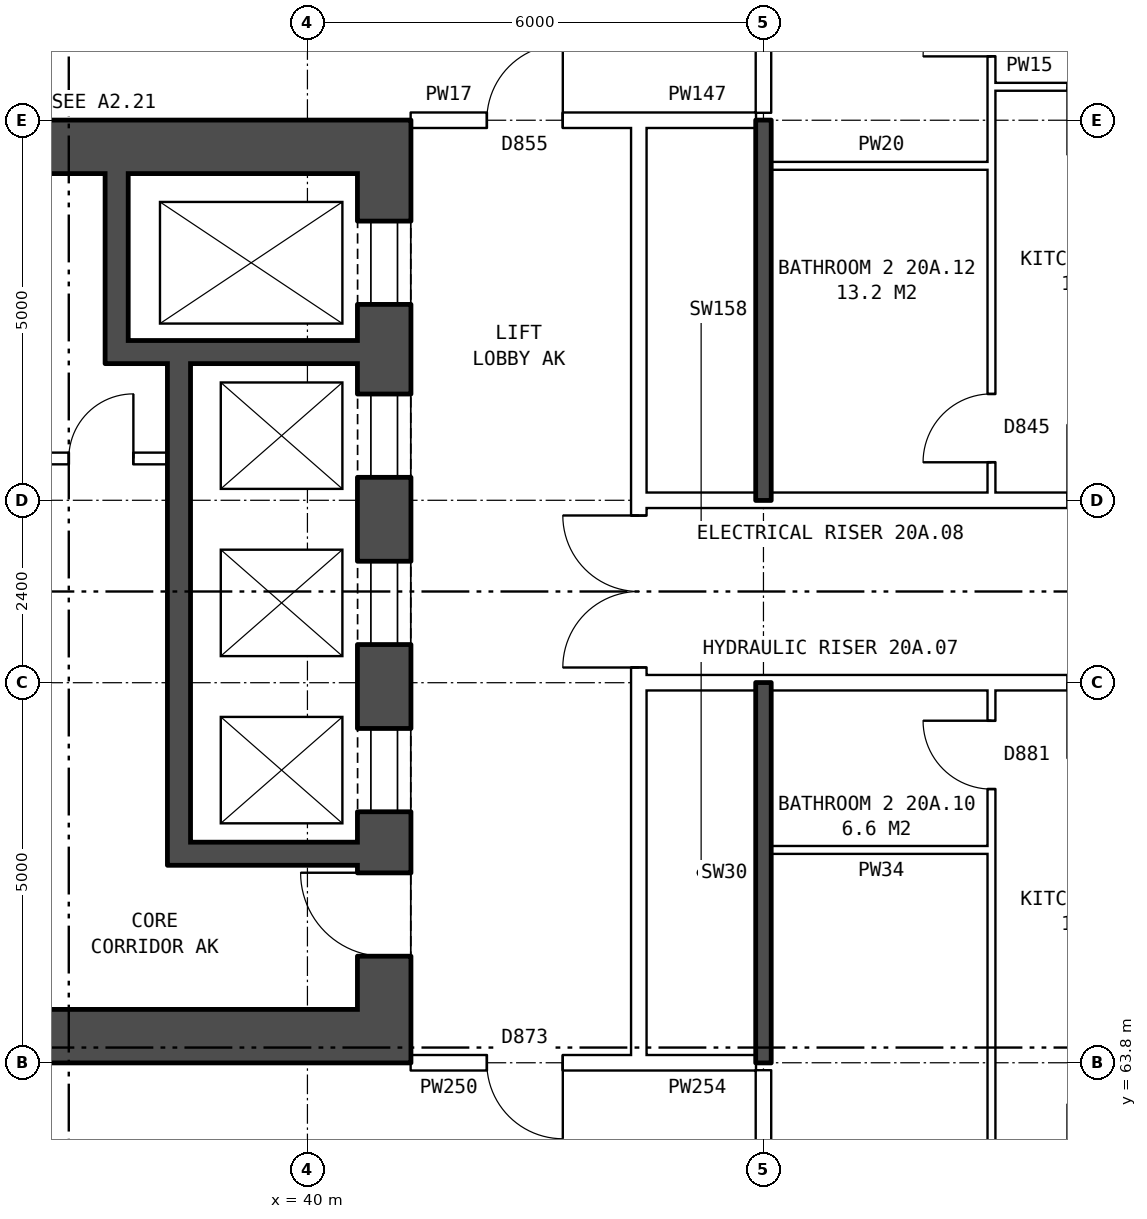
"""IFC4 building model, lengths in metres.
Left out: names, types, materials, properties, quantities, classifications, styles, units other than length and angle.
Written with IfcOpenShell. Run it as: python <this file> out.ifc"""

import sys

from ifc_helpers import new_model, si_unit, direction, frame, frame_2d, origin, place, context, subcontext, project, spatial, rectangle, extrude, element, fill, save


model = new_model("IFC4")
c1 = context("Model", 3, precision=1e-05, world=origin(), true_north=direction((0.0, 1.0)))
c2 = subcontext(c1, "Body", "Model", "MODEL_VIEW")
j1 = project(units=[si_unit("LENGTHUNIT", "METRE"), si_unit("PLANEANGLEUNIT", "RADIAN")], contexts=[c1])
p1 = place(None, origin())
s1 = spatial("IfcSite", under=j1, at=p1, CompositionType="ELEMENT")
p2 = place(p1, origin())
s2 = spatial("IfcBuilding", under=s1, at=p2, CompositionType="ELEMENT")
p3 = place(p2, frame((0.0, 0.0, 74.7)))
s3 = spatial("IfcBuildingStorey", under=s2, at=p3, CompositionType="ELEMENT", Elevation=74.7)
p4 = place(p3, frame((41.01, 75.5, 0.0), z_axis=(0.0, 0.0, 1.0), x_axis=(0.0, -1.0, 0.0)))
e1 = element("IfcWall", 1, at=p4, inside=s3, PredefinedType="SHEAR", context=c2, shape_type="SweptSolid", body=[
    extrude(rectangle(XDim=11.0, YDim=0.7, at=frame_2d((5.5, 0.0))), origin(), (0.0, 0.0, 1.0), 2.85),
])
p5 = place(p4, frame((0.625, 0.0, 0.0)))
e2 = element("IfcOpeningElement", 2, at=p5, cuts=e1, PredefinedType="OPENING", context=c2, shape_type="SweptSolid", body=[
    extrude(rectangle(XDim=1.1, YDim=2.1, at=frame_2d((0.55, 1.05))), frame((0.0, 0.36, 0.0), z_axis=(0.0, -1.0, 0.0), x_axis=(1.0, 0.0, 0.0)), (0.0, 0.0, 1.0), 0.72),
])
p6 = place(p4, frame((2.9, 0.0, 0.0)))
e3 = element("IfcOpeningElement", 3, at=p6, cuts=e1, PredefinedType="OPENING", context=c2, shape_type="SweptSolid", body=[
    extrude(rectangle(XDim=1.1, YDim=2.1, at=frame_2d((0.55, 1.05))), frame((0.0, 0.36, 0.0), z_axis=(0.0, -1.0, 0.0), x_axis=(1.0, 0.0, 0.0)), (0.0, 0.0, 1.0), 0.72),
])
p7 = place(p4, frame((5.1, 0.0, 0.0)))
e4 = element("IfcOpeningElement", 4, at=p7, cuts=e1, PredefinedType="OPENING", context=c2, shape_type="SweptSolid", body=[
    extrude(rectangle(XDim=1.1, YDim=2.1, at=frame_2d((0.55, 1.05))), frame((0.0, 0.36, 0.0), z_axis=(0.0, -1.0, 0.0), x_axis=(1.0, 0.0, 0.0)), (0.0, 0.0, 1.0), 0.72),
])
p8 = place(p4, frame((7.3, 0.0, 0.0)))
e5 = element("IfcOpeningElement", 5, at=p8, cuts=e1, PredefinedType="OPENING", context=c2, shape_type="SweptSolid", body=[
    extrude(rectangle(XDim=1.1, YDim=2.1, at=frame_2d((0.55, 1.05))), frame((0.0, 0.36, 0.0), z_axis=(0.0, -1.0, 0.0), x_axis=(1.0, 0.0, 0.0)), (0.0, 0.0, 1.0), 0.72),
])
p9 = place(p4, frame((9.2, 0.0, 0.0)))
e6 = element("IfcOpeningElement", 6, at=p9, cuts=e1, PredefinedType="OPENING", context=c2, shape_type="SweptSolid", body=[
    extrude(rectangle(XDim=1.1, YDim=2.1, at=frame_2d((0.55, 1.05))), frame((0.0, 0.36, 0.0), z_axis=(0.0, -1.0, 0.0), x_axis=(1.0, 0.0, 0.0)), (0.0, 0.0, 1.0), 0.72),
])
for number, where, z_axis, x_axis in (
    (7, (41.36, 75.85, 0.0), (0.0, 0.0, 1.0), (-1.0, 0.0, 0.0)),
    (8, (41.36, 64.15, 0.0), (0.0, 0.0, 1.0), (-1.0, 0.0, 0.0)),
):
    element("IfcWall", number, at=place(p3, frame(where, z_axis=z_axis, x_axis=x_axis)), inside=s3, PredefinedType="SHEAR", context=c2, shape_type="SweptSolid", body=[
        extrude(rectangle(XDim=9.0, YDim=0.7, at=frame_2d((4.5, 0.0))), origin(), (0.0, 0.0, 1.0), 2.85),
    ])
p10 = place(p3, frame((40.66, 73.15, 0.0), z_axis=(0.0, 0.0, 1.0), x_axis=(-1.0, 0.0, 0.0)))
e9 = element("IfcWall", 9, at=p10, inside=s3, PredefinedType="SHEAR", context=c2, shape_type="SweptSolid", body=[
    extrude(rectangle(XDim=3.32, YDim=0.3, at=frame_2d((1.66, 0.0))), origin(), (0.0, 0.0, 1.0), 2.85),
])
p11 = place(p3, frame((38.16, 71.75, 0.0), z_axis=(0.0, 0.0, 1.0), x_axis=(-1.0, 0.0, 0.0)))
e10 = element("IfcWall", 10, at=p11, inside=s3, PredefinedType="PARTITIONING", context=c2, shape_type="SweptSolid", body=[
    extrude(rectangle(XDim=1.75, YDim=0.15, at=frame_2d((0.875, 0.0))), origin(), (0.0, 0.0, 1.0), 2.85),
])
p12 = place(p11, frame((0.45, 0.0, 0.0)))
e11 = element("IfcOpeningElement", 11, at=p12, cuts=e10, PredefinedType="OPENING", context=c2, shape_type="SweptSolid", body=[
    extrude(rectangle(XDim=0.85, YDim=2.1, at=frame_2d((0.425, 1.05))), frame((0.0, 0.085, 0.0), z_axis=(0.0, -1.0, 0.0), x_axis=(1.0, 0.0, 0.0)), (0.0, 0.0, 1.0), 0.17),
])
p13 = place(p3, frame((40.66, 66.55, 0.0), z_axis=(0.0, 0.0, 1.0), x_axis=(-1.0, 0.0, 0.0)))
e12 = element("IfcWall", 12, at=p13, inside=s3, PredefinedType="SHEAR", context=c2, shape_type="SweptSolid", body=[
    extrude(rectangle(XDim=2.2, YDim=0.3, at=frame_2d((1.1, 0.0))), origin(), (0.0, 0.0, 1.0), 2.85),
])
p14 = place(p3, frame((38.31, 73.0, 0.0), z_axis=(0.0, 0.0, 1.0), x_axis=(0.0, -1.0, 0.0)))
e13 = element("IfcWall", 13, at=p14, inside=s3, PredefinedType="SHEAR", context=c2, shape_type="SweptSolid", body=[
    extrude(rectangle(XDim=6.6, YDim=0.3, at=frame_2d((3.3, 0.0))), origin(), (0.0, 0.0, 1.0), 2.85),
])
p15 = place(p3, frame((37.49, 75.5, 0.0), z_axis=(0.0, 0.0, 1.0), x_axis=(0.0, -1.0, 0.0)))
e14 = element("IfcWall", 14, at=p15, inside=s3, PredefinedType="SHEAR", context=c2, shape_type="SweptSolid", body=[
    extrude(rectangle(XDim=2.2, YDim=0.3, at=frame_2d((1.1, 0.0))), origin(), (0.0, 0.0, 1.0), 2.85),
])
p16 = place(p3, frame((44.36, 63.9, 0.0), z_axis=(0.0, 0.0, 1.0), x_axis=(0.0, 1.0, 0.0)))
e15 = element("IfcWall", 15, at=p16, inside=s3, PredefinedType="PARTITIONING", context=c2, shape_type="SweptSolid", body=[
    extrude(rectangle(XDim=12.2, YDim=0.2, at=frame_2d((6.1, 0.0))), origin(), (0.0, 0.0, 1.0), 2.85),
])
p17 = place(p16, frame((5.1, 0.0, 0.0)))
e16 = element("IfcOpeningElement", 16, at=p17, cuts=e15, PredefinedType="OPENING", context=c2, shape_type="SweptSolid", body=[
    extrude(rectangle(XDim=2.0, YDim=2.1, at=frame_2d((1.0, 1.05))), frame((0.0, 0.11, 0.0), z_axis=(0.0, -1.0, 0.0), x_axis=(1.0, 0.0, 0.0)), (0.0, 0.0, 1.0), 0.22),
])
p18 = place(p3, frame((41.36, 63.8, 0.0), z_axis=(0.0, 0.0, 1.0), x_axis=(1.0, 0.0, 0.0)))
e17 = element("IfcWall", 17, at=p18, inside=s3, PredefinedType="PARTITIONING", context=c2, shape_type="SweptSolid", body=[
    extrude(rectangle(XDim=3.0, YDim=0.2, at=frame_2d((1.5, 0.0))), origin(), (0.0, 0.0, 1.0), 2.85),
])
p19 = place(p18, frame((1.0, 0.0, 0.0)))
e18 = element("IfcOpeningElement", 18, at=p19, cuts=e17, PredefinedType="OPENING", context=c2, shape_type="SweptSolid", body=[
    extrude(rectangle(XDim=1.0, YDim=2.1, at=frame_2d((0.5, 1.05))), frame((0.0, 0.11, 0.0), z_axis=(0.0, -1.0, 0.0), x_axis=(1.0, 0.0, 0.0)), (0.0, 0.0, 1.0), 0.22),
])
p20 = place(p3, frame((44.36, 63.8, 0.0), z_axis=(0.0, 0.0, 1.0), x_axis=(1.0, 0.0, 0.0)))
e19 = element("IfcWall", 19, at=p20, inside=s3, PredefinedType="PARTITIONING", context=c2, shape_type="SweptSolid", body=[
    extrude(rectangle(XDim=1.54, YDim=0.2, at=frame_2d((0.77, 0.0))), origin(), (0.0, 0.0, 1.0), 2.85),
])
p21 = place(p3, frame((46.1, 66.6, 0.0), z_axis=(0.0, 0.0, 1.0), x_axis=(1.0, 0.0, 0.0)))
e20 = element("IfcWall", 20, at=p21, inside=s3, PredefinedType="PARTITIONING", context=c2, shape_type="SweptSolid", body=[
    extrude(rectangle(XDim=2.9, YDim=0.1, at=frame_2d((1.45, 0.0))), origin(), (0.0, 0.0, 1.0), 2.85),
])
p22 = place(p3, frame((44.36, 68.8, 0.0), z_axis=(0.0, 0.0, 1.0), x_axis=(1.0, 0.0, 0.0)))
e21 = element("IfcWall", 21, at=p22, inside=s3, PredefinedType="PARTITIONING", context=c2, shape_type="SweptSolid", body=[
    extrude(rectangle(XDim=19.28, YDim=0.2, at=frame_2d((9.64, 0.0))), origin(), (0.0, 0.0, 1.0), 2.85),
])
p23 = place(p22, frame((14.64, 0.0, 0.0)))
e22 = element("IfcOpeningElement", 22, at=p23, cuts=e21, PredefinedType="OPENING", context=c2, shape_type="SweptSolid", body=[
    extrude(rectangle(XDim=1.0, YDim=2.1, at=frame_2d((0.5, 1.05))), frame((0.0, 0.11, 0.0), z_axis=(0.0, -1.0, 0.0), x_axis=(1.0, 0.0, 0.0)), (0.0, 0.0, 1.0), 0.22),
])
p24 = place(p22, frame((5.64, 0.0, 0.0)))
e23 = element("IfcOpeningElement", 23, at=p24, cuts=e21, PredefinedType="OPENING", context=c2, shape_type="SweptSolid", body=[
    extrude(rectangle(XDim=1.0, YDim=2.1, at=frame_2d((0.5, 1.05))), frame((0.0, 0.11, 0.0), z_axis=(0.0, -1.0, 0.0), x_axis=(1.0, 0.0, 0.0)), (0.0, 0.0, 1.0), 0.22),
])
p25 = place(p3, frame((44.36, 71.2, 0.0), z_axis=(0.0, 0.0, 1.0), x_axis=(1.0, 0.0, 0.0)))
e24 = element("IfcWall", 24, at=p25, inside=s3, PredefinedType="PARTITIONING", context=c2, shape_type="SweptSolid", body=[
    extrude(rectangle(XDim=19.28, YDim=0.2, at=frame_2d((9.64, 0.0))), origin(), (0.0, 0.0, 1.0), 2.85),
])
p26 = place(p25, frame((14.64, 0.0, 0.0)))
e25 = element("IfcOpeningElement", 25, at=p26, cuts=e24, PredefinedType="OPENING", context=c2, shape_type="SweptSolid", body=[
    extrude(rectangle(XDim=1.0, YDim=2.1, at=frame_2d((0.5, 1.05))), frame((0.0, 0.11, 0.0), z_axis=(0.0, -1.0, 0.0), x_axis=(1.0, 0.0, 0.0)), (0.0, 0.0, 1.0), 0.22),
])
p27 = place(p25, frame((5.64, 0.0, 0.0)))
e26 = element("IfcOpeningElement", 26, at=p27, cuts=e24, PredefinedType="OPENING", context=c2, shape_type="SweptSolid", body=[
    extrude(rectangle(XDim=1.0, YDim=2.1, at=frame_2d((0.5, 1.05))), frame((0.0, 0.11, 0.0), z_axis=(0.0, -1.0, 0.0), x_axis=(1.0, 0.0, 0.0)), (0.0, 0.0, 1.0), 0.22),
])
p28 = place(p3, frame((46.1, 75.6, 0.0), z_axis=(0.0, 0.0, 1.0), x_axis=(1.0, 0.0, 0.0)))
e27 = element("IfcWall", 27, at=p28, inside=s3, PredefinedType="PARTITIONING", context=c2, shape_type="SweptSolid", body=[
    extrude(rectangle(XDim=2.9, YDim=0.1, at=frame_2d((1.45, 0.0))), origin(), (0.0, 0.0, 1.0), 2.85),
])
p29 = place(p3, frame((41.36, 76.2, 0.0), z_axis=(0.0, 0.0, 1.0), x_axis=(1.0, 0.0, 0.0)))
e28 = element("IfcWall", 28, at=p29, inside=s3, PredefinedType="PARTITIONING", context=c2, shape_type="SweptSolid", body=[
    extrude(rectangle(XDim=3.0, YDim=0.2, at=frame_2d((1.5, 0.0))), origin(), (0.0, 0.0, 1.0), 2.85),
])
p30 = place(p29, frame((1.0, 0.0, 0.0)))
e29 = element("IfcOpeningElement", 29, at=p30, cuts=e28, PredefinedType="OPENING", context=c2, shape_type="SweptSolid", body=[
    extrude(rectangle(XDim=1.0, YDim=2.1, at=frame_2d((0.5, 1.05))), frame((0.0, 0.11, 0.0), z_axis=(0.0, -1.0, 0.0), x_axis=(1.0, 0.0, 0.0)), (0.0, 0.0, 1.0), 0.22),
])
p31 = place(p3, frame((44.36, 76.2, 0.0), z_axis=(0.0, 0.0, 1.0), x_axis=(1.0, 0.0, 0.0)))
e30 = element("IfcWall", 30, at=p31, inside=s3, PredefinedType="PARTITIONING", context=c2, shape_type="SweptSolid", body=[
    extrude(rectangle(XDim=1.54, YDim=0.2, at=frame_2d((0.77, 0.0))), origin(), (0.0, 0.0, 1.0), 2.85),
])
p32 = place(p3, frame((49.0, 76.64, 0.0), z_axis=(0.0, 0.0, 1.0), x_axis=(1.0, 0.0, 0.0)))
e31 = element("IfcWall", 31, at=p32, inside=s3, PredefinedType="PARTITIONING", context=c2, shape_type="SweptSolid", body=[
    extrude(rectangle(XDim=2.9, YDim=0.1, at=frame_2d((1.45, 0.0))), origin(), (0.0, 0.0, 1.0), 2.85),
])
p33 = place(p32, frame((1.0, 0.0, 0.0)))
e32 = element("IfcOpeningElement", 32, at=p33, cuts=e31, PredefinedType="OPENING", context=c2, shape_type="SweptSolid", body=[
    extrude(rectangle(XDim=0.9, YDim=2.1, at=frame_2d((0.45, 1.05))), frame((0.0, 0.06, 0.0), z_axis=(0.0, -1.0, 0.0), x_axis=(1.0, 0.0, 0.0)), (0.0, 0.0, 1.0), 0.12),
])
p34 = place(p3, frame((46.0, 61.5, 0.0), z_axis=(0.0, 0.0, 1.0), x_axis=(0.0, 1.0, 0.0)))
e33 = element("IfcWall", 33, at=p34, inside=s3, PredefinedType="PARTITIONING", context=c2, shape_type="SweptSolid", body=[
    extrude(rectangle(XDim=2.2, YDim=0.2, at=frame_2d((1.1, 0.0))), origin(), (0.0, 0.0, 1.0), 2.85),
])
for number, where, z_axis, x_axis in (
    (34, (46.0, 63.8, 0.0), (0.0, 0.0, 1.0), (0.0, 1.0, 0.0)),
    (35, (46.0, 71.2, 0.0), (0.0, 0.0, 1.0), (0.0, 1.0, 0.0)),
):
    element("IfcWall", number, at=place(p3, frame(where, z_axis=z_axis, x_axis=x_axis)), inside=s3, PredefinedType="SOLIDWALL", context=c2, shape_type="SweptSolid", body=[
        extrude(rectangle(XDim=5.0, YDim=0.2, at=frame_2d((2.5, 0.0))), origin(), (0.0, 0.0, 1.0), 2.85),
    ])
p35 = place(p3, frame((46.0, 76.3, 0.0), z_axis=(0.0, 0.0, 1.0), x_axis=(0.0, 1.0, 0.0)))
e36 = element("IfcWall", 36, at=p35, inside=s3, PredefinedType="PARTITIONING", context=c2, shape_type="SweptSolid", body=[
    extrude(rectangle(XDim=2.2, YDim=0.2, at=frame_2d((1.1, 0.0))), origin(), (0.0, 0.0, 1.0), 2.85),
])
p36 = place(p3, frame((49.0, 54.36, 0.0), z_axis=(0.0, 0.0, 1.0), x_axis=(0.0, 1.0, 0.0)))
e37 = element("IfcWall", 37, at=p36, inside=s3, PredefinedType="PARTITIONING", context=c2, shape_type="SweptSolid", body=[
    extrude(rectangle(XDim=14.34, YDim=0.1, at=frame_2d((7.17, 0.0))), origin(), (0.0, 0.0, 1.0), 2.85),
])
p37 = place(p36, frame((6.7, 0.0, 0.0)))
e38 = element("IfcOpeningElement", 38, at=p37, cuts=e37, PredefinedType="OPENING", context=c2, shape_type="SweptSolid", body=[
    extrude(rectangle(XDim=0.9, YDim=2.1, at=frame_2d((0.45, 1.05))), frame((0.0, 0.06, 0.0), z_axis=(0.0, -1.0, 0.0), x_axis=(1.0, 0.0, 0.0)), (0.0, 0.0, 1.0), 0.12),
])
p38 = place(p36, frame((13.04, 0.0, 0.0)))
e39 = element("IfcOpeningElement", 39, at=p38, cuts=e37, PredefinedType="OPENING", context=c2, shape_type="SweptSolid", body=[
    extrude(rectangle(XDim=0.9, YDim=2.1, at=frame_2d((0.45, 1.05))), frame((0.0, 0.06, 0.0), z_axis=(0.0, -1.0, 0.0), x_axis=(1.0, 0.0, 0.0)), (0.0, 0.0, 1.0), 0.12),
])
p39 = place(p3, frame((49.0, 71.3, 0.0), z_axis=(0.0, 0.0, 1.0), x_axis=(0.0, 1.0, 0.0)))
e40 = element("IfcWall", 40, at=p39, inside=s3, PredefinedType="PARTITIONING", context=c2, shape_type="SweptSolid", body=[
    extrude(rectangle(XDim=14.34, YDim=0.1, at=frame_2d((7.17, 0.0))), origin(), (0.0, 0.0, 1.0), 2.85),
])
p40 = place(p39, frame((5.74, 0.0, 0.0)))
e41 = element("IfcOpeningElement", 41, at=p40, cuts=e40, PredefinedType="OPENING", context=c2, shape_type="SweptSolid", body=[
    extrude(rectangle(XDim=0.9, YDim=2.1, at=frame_2d((0.45, 1.05))), frame((0.0, 0.06, 0.0), z_axis=(0.0, -1.0, 0.0), x_axis=(1.0, 0.0, 0.0)), (0.0, 0.0, 1.0), 0.12),
])
p41 = place(p39, frame((0.4, 0.0, 0.0)))
e42 = element("IfcOpeningElement", 42, at=p41, cuts=e40, PredefinedType="OPENING", context=c2, shape_type="SweptSolid", body=[
    extrude(rectangle(XDim=0.9, YDim=2.1, at=frame_2d((0.45, 1.05))), frame((0.0, 0.06, 0.0), z_axis=(0.0, -1.0, 0.0), x_axis=(1.0, 0.0, 0.0)), (0.0, 0.0, 1.0), 0.12),
])
p42 = place(p5, origin())
e43 = element("IfcDoor", 43, at=p42, inside=s3, OperationType="DOUBLE_DOOR_SLIDING", PredefinedType="DOOR", context=c2, shape_type="SweptSolid", body=[
    extrude(rectangle(XDim=1.1, YDim=2.1, at=frame_2d((0.55, 1.05))), frame((0.0, -0.285, 0.0), z_axis=(0.0, -1.0, 0.0), x_axis=(1.0, 0.0, 0.0)), (0.0, 0.0, 1.0), 0.05),
])
fill(e2, e43)
p43 = place(p6, origin())
e44 = element("IfcDoor", 44, at=p43, inside=s3, OperationType="DOUBLE_DOOR_SLIDING", PredefinedType="DOOR", context=c2, shape_type="SweptSolid", body=[
    extrude(rectangle(XDim=1.1, YDim=2.1, at=frame_2d((0.55, 1.05))), frame((0.0, -0.285, 0.0), z_axis=(0.0, -1.0, 0.0), x_axis=(1.0, 0.0, 0.0)), (0.0, 0.0, 1.0), 0.05),
])
fill(e3, e44)
p44 = place(p7, origin())
e45 = element("IfcDoor", 45, at=p44, inside=s3, OperationType="DOUBLE_DOOR_SLIDING", PredefinedType="DOOR", context=c2, shape_type="SweptSolid", body=[
    extrude(rectangle(XDim=1.1, YDim=2.1, at=frame_2d((0.55, 1.05))), frame((0.0, -0.285, 0.0), z_axis=(0.0, -1.0, 0.0), x_axis=(1.0, 0.0, 0.0)), (0.0, 0.0, 1.0), 0.05),
])
fill(e4, e45)
p45 = place(p8, origin())
e46 = element("IfcDoor", 46, at=p45, inside=s3, OperationType="DOUBLE_DOOR_SLIDING", PredefinedType="DOOR", context=c2, shape_type="SweptSolid", body=[
    extrude(rectangle(XDim=1.1, YDim=2.1, at=frame_2d((0.55, 1.05))), frame((0.0, -0.285, 0.0), z_axis=(0.0, -1.0, 0.0), x_axis=(1.0, 0.0, 0.0)), (0.0, 0.0, 1.0), 0.05),
])
fill(e5, e46)
p46 = place(p9, frame((1.1, 0.0, 0.0), z_axis=(0.0, 0.0, 1.0), x_axis=(-1.0, 0.0, 0.0)))
e47 = element("IfcDoor", 47, at=p46, inside=s3, OperationType="SINGLE_SWING_RIGHT", PredefinedType="DOOR", context=c2, shape_type="SweptSolid", body=[
    extrude(rectangle(XDim=1.1, YDim=2.1, at=frame_2d((0.55, 1.05))), frame((0.0, 0.335, 0.0), z_axis=(0.0, -1.0, 0.0), x_axis=(1.0, 0.0, 0.0)), (0.0, 0.0, 1.0), 0.05),
])
fill(e6, e47)
p47 = place(p12, frame((0.85, 0.0, 0.0), z_axis=(0.0, 0.0, 1.0), x_axis=(-1.0, 0.0, 0.0)))
e48 = element("IfcDoor", 48, at=p47, inside=s3, OperationType="SINGLE_SWING_RIGHT", PredefinedType="DOOR", context=c2, shape_type="SweptSolid", body=[
    extrude(rectangle(XDim=0.85, YDim=2.1, at=frame_2d((0.425, 1.05))), frame((0.0, 0.025, 0.0), z_axis=(0.0, -1.0, 0.0), x_axis=(1.0, 0.0, 0.0)), (0.0, 0.0, 1.0), 0.05),
])
fill(e11, e48)
p48 = place(p17, origin())
e49 = element("IfcDoor", 49, at=p48, inside=s3, OperationType="DOUBLE_DOOR_SINGLE_SWING", PredefinedType="DOOR", context=c2, shape_type="SweptSolid", body=[
    extrude(rectangle(XDim=2.0, YDim=2.1, at=frame_2d((1.0, 1.05))), frame((0.0, 0.025, 0.0), z_axis=(0.0, -1.0, 0.0), x_axis=(1.0, 0.0, 0.0)), (0.0, 0.0, 1.0), 0.05),
])
fill(e16, e49)
p49 = place(p19, frame((1.0, 0.0, 0.0), z_axis=(0.0, 0.0, 1.0), x_axis=(-1.0, 0.0, 0.0)))
e50 = element("IfcDoor", 50, at=p49, inside=s3, OperationType="SINGLE_SWING_LEFT", PredefinedType="DOOR", context=c2, shape_type="SweptSolid", body=[
    extrude(rectangle(XDim=1.0, YDim=2.1, at=frame_2d((0.5, 1.05))), frame((0.0, 0.025, 0.0), z_axis=(0.0, -1.0, 0.0), x_axis=(1.0, 0.0, 0.0)), (0.0, 0.0, 1.0), 0.05),
])
fill(e18, e50)
p50 = place(p30, origin())
e51 = element("IfcDoor", 51, at=p50, inside=s3, OperationType="SINGLE_SWING_RIGHT", PredefinedType="DOOR", context=c2, shape_type="SweptSolid", body=[
    extrude(rectangle(XDim=1.0, YDim=2.1, at=frame_2d((0.5, 1.05))), frame((0.0, 0.025, 0.0), z_axis=(0.0, -1.0, 0.0), x_axis=(1.0, 0.0, 0.0)), (0.0, 0.0, 1.0), 0.05),
])
fill(e29, e51)
p51 = place(p38, origin())
e52 = element("IfcDoor", 52, at=p51, inside=s3, OperationType="SINGLE_SWING_RIGHT", PredefinedType="DOOR", context=c2, shape_type="SweptSolid", body=[
    extrude(rectangle(XDim=0.9, YDim=2.1, at=frame_2d((0.45, 1.05))), frame((0.0, 0.025, 0.0), z_axis=(0.0, -1.0, 0.0), x_axis=(1.0, 0.0, 0.0)), (0.0, 0.0, 1.0), 0.05),
])
fill(e39, e52)
p52 = place(p40, origin())
e53 = element("IfcDoor", 53, at=p52, inside=s3, OperationType="SINGLE_SWING_LEFT", PredefinedType="DOOR", context=c2, shape_type="SweptSolid", body=[
    extrude(rectangle(XDim=0.9, YDim=2.1, at=frame_2d((0.45, 1.05))), frame((0.0, 0.025, 0.0), z_axis=(0.0, -1.0, 0.0), x_axis=(1.0, 0.0, 0.0)), (0.0, 0.0, 1.0), 0.05),
])
fill(e41, e53)
p53 = place(p41, origin())
e54 = element("IfcDoor", 54, at=p53, inside=s3, OperationType="SINGLE_SWING_LEFT", PredefinedType="DOOR", context=c2, shape_type="SweptSolid", body=[
    extrude(rectangle(XDim=0.9, YDim=2.1, at=frame_2d((0.45, 1.05))), frame((0.0, 0.025, 0.0), z_axis=(0.0, -1.0, 0.0), x_axis=(1.0, 0.0, 0.0)), (0.0, 0.0, 1.0), 0.05),
])
fill(e42, e54)
save(model, sys.argv[1])
